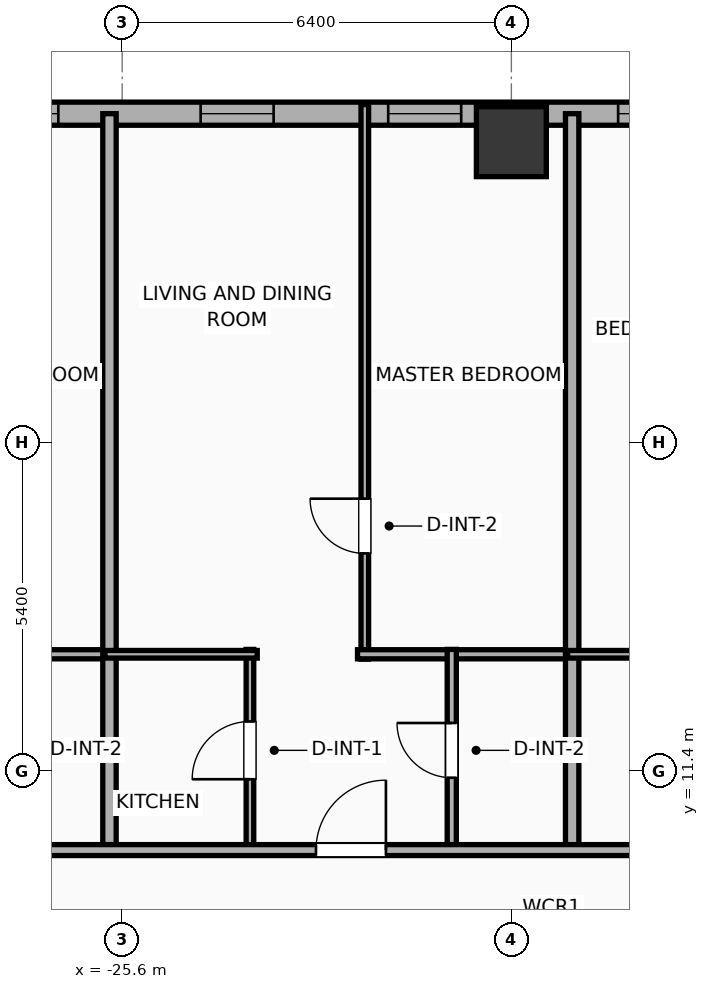
"""IFC4 building model, lengths in metres.
Left out: names, types, materials, properties, quantities, classifications, styles, units other than length and angle.
Written with IfcOpenShell. Run it as: python <this file> out.ifc"""

import sys

from ifc_helpers import new_model, si_unit, direction, frame, frame_2d, origin, origin_2d, place, context, subcontext, project, spatial, rectangle, hollow_rectangle, extrude, element, fill, save


model = new_model("IFC4")
c1 = context("Model", 3, precision=1e-05, world=origin(), true_north=direction((0.0, 1.0)))
c2 = subcontext(c1, "Body", "Model", "MODEL_VIEW")
j1 = project(units=[si_unit("LENGTHUNIT", "METRE"), si_unit("PLANEANGLEUNIT", "RADIAN")], contexts=[c1])
p1 = place(None, origin())
s1 = spatial("IfcSite", under=j1, at=p1, CompositionType="ELEMENT")
p2 = place(p1, origin())
s2 = spatial("IfcBuilding", under=s1, at=p2, CompositionType="ELEMENT")
p3 = place(p2, frame((0.0, 0.0, 37.7)))
s3 = spatial("IfcBuildingStorey", under=s2, at=p3, CompositionType="ELEMENT", Elevation=37.7)
p4 = place(p3, frame((-19.2, 21.75, 0.0), z_axis=(0.0, 0.0, 1.0), x_axis=(1.0, 0.0, 0.0)))
e1 = element("IfcColumn", 1, at=p4, inside=s3, PredefinedType="COLUMN", context=c2, shape_type="SweptSolid", body=[
    extrude(hollow_rectangle(XDim=1.15, YDim=1.15, WallThickness=0.04, at=origin_2d()), origin(), (0.0, 0.0, 1.0), 3.9),
])
p5 = place(p3, frame((-29.581, 22.21, 0.0), z_axis=(0.0, 0.0, 1.0), x_axis=(1.0, 0.0, 0.0)))
e2 = element("IfcWall", 2, at=p5, inside=s3, PredefinedType="ELEMENTEDWALL", context=c2, shape_type="SweptSolid", body=[
    extrude(rectangle(XDim=51.963, YDim=0.38, at=frame_2d((25.981, 0.0))), origin(), (0.0, 0.0, 1.0), 3.65),
])
p6 = place(p5, frame((25.631, 0.0, 0.75)))
e3 = element("IfcOpeningElement", 3, at=p6, cuts=e2, PredefinedType="OPENING", context=c2, shape_type="SweptSolid", body=[
    extrude(rectangle(XDim=2.4, YDim=2.1, at=frame_2d((1.2, 1.05))), frame((0.0, 0.2, 0.0), z_axis=(0.0, -1.0, 0.0), x_axis=(1.0, 0.0, 0.0)), (0.0, 0.0, 1.0), 0.4),
])
p7 = place(p5, frame((42.952, 0.0, 0.75)))
e4 = element("IfcOpeningElement", 4, at=p7, cuts=e2, PredefinedType="OPENING", context=c2, shape_type="SweptSolid", body=[
    extrude(rectangle(XDim=2.4, YDim=2.1, at=frame_2d((1.2, 1.05))), frame((0.0, 0.2, 0.0), z_axis=(0.0, -1.0, 0.0), x_axis=(1.0, 0.0, 0.0)), (0.0, 0.0, 1.0), 0.4),
])
p8 = place(p5, frame((1.731, 0.0, 0.75)))
e5 = element("IfcOpeningElement", 5, at=p8, cuts=e2, PredefinedType="OPENING", context=c2, shape_type="SweptSolid", body=[
    extrude(rectangle(XDim=1.2, YDim=2.05, at=frame_2d((0.6, 1.025))), frame((0.0, 0.2, 0.0), z_axis=(0.0, -1.0, 0.0), x_axis=(1.0, 0.0, 0.0)), (0.0, 0.0, 1.0), 0.4),
])
p9 = place(p5, frame((5.272, 0.0, 0.75)))
e6 = element("IfcOpeningElement", 6, at=p9, cuts=e2, PredefinedType="OPENING", context=c2, shape_type="SweptSolid", body=[
    extrude(rectangle(XDim=1.2, YDim=2.05, at=frame_2d((0.6, 1.025))), frame((0.0, 0.2, 0.0), z_axis=(0.0, -1.0, 0.0), x_axis=(1.0, 0.0, 0.0)), (0.0, 0.0, 1.0), 0.4),
])
p10 = place(p5, frame((8.356, 0.0, 0.75)))
e7 = element("IfcOpeningElement", 7, at=p10, cuts=e2, PredefinedType="OPENING", context=c2, shape_type="SweptSolid", body=[
    extrude(rectangle(XDim=1.2, YDim=2.05, at=frame_2d((0.6, 1.025))), frame((0.0, 0.2, 0.0), z_axis=(0.0, -1.0, 0.0), x_axis=(1.0, 0.0, 0.0)), (0.0, 0.0, 1.0), 0.4),
])
p11 = place(p5, frame((15.632, 0.0, 0.75)))
e8 = element("IfcOpeningElement", 8, at=p11, cuts=e2, PredefinedType="OPENING", context=c2, shape_type="SweptSolid", body=[
    extrude(rectangle(XDim=1.2, YDim=2.05, at=frame_2d((0.6, 1.025))), frame((0.0, 0.2, 0.0), z_axis=(0.0, -1.0, 0.0), x_axis=(1.0, 0.0, 0.0)), (0.0, 0.0, 1.0), 0.4),
])
p12 = place(p5, frame((12.137, 0.0, 0.75)))
e9 = element("IfcOpeningElement", 9, at=p12, cuts=e2, PredefinedType="OPENING", context=c2, shape_type="SweptSolid", body=[
    extrude(rectangle(XDim=1.2, YDim=2.05, at=frame_2d((0.6, 1.025))), frame((0.0, 0.2, 0.0), z_axis=(0.0, -1.0, 0.0), x_axis=(1.0, 0.0, 0.0)), (0.0, 0.0, 1.0), 0.4),
])
p13 = place(p5, frame((18.756, 0.0, 0.75)))
e10 = element("IfcOpeningElement", 10, at=p13, cuts=e2, PredefinedType="OPENING", context=c2, shape_type="SweptSolid", body=[
    extrude(rectangle(XDim=1.2, YDim=2.05, at=frame_2d((0.6, 1.025))), frame((0.0, 0.2, 0.0), z_axis=(0.0, -1.0, 0.0), x_axis=(1.0, 0.0, 0.0)), (0.0, 0.0, 1.0), 0.4),
])
p14 = place(p5, frame((22.907, 0.0, 0.75)))
e11 = element("IfcOpeningElement", 11, at=p14, cuts=e2, PredefinedType="OPENING", context=c2, shape_type="SweptSolid", body=[
    extrude(rectangle(XDim=1.2, YDim=2.05, at=frame_2d((0.6, 1.025))), frame((0.0, 0.2, 0.0), z_axis=(0.0, -1.0, 0.0), x_axis=(1.0, 0.0, 0.0)), (0.0, 0.0, 1.0), 0.4),
])
p15 = place(p5, frame((36.381, 0.0, 0.75)))
e12 = element("IfcOpeningElement", 12, at=p15, cuts=e2, PredefinedType="OPENING", context=c2, shape_type="SweptSolid", body=[
    extrude(rectangle(XDim=1.2, YDim=2.05, at=frame_2d((0.6, 1.025))), frame((0.0, 0.2, 0.0), z_axis=(0.0, -1.0, 0.0), x_axis=(1.0, 0.0, 0.0)), (0.0, 0.0, 1.0), 0.4),
])
p16 = place(p5, frame((32.886, 0.0, 0.75)))
e13 = element("IfcOpeningElement", 13, at=p16, cuts=e2, PredefinedType="OPENING", context=c2, shape_type="SweptSolid", body=[
    extrude(rectangle(XDim=1.2, YDim=2.05, at=frame_2d((0.6, 1.025))), frame((0.0, 0.2, 0.0), z_axis=(0.0, -1.0, 0.0), x_axis=(1.0, 0.0, 0.0)), (0.0, 0.0, 1.0), 0.4),
])
p17 = place(p5, frame((39.556, 0.0, 0.75)))
e14 = element("IfcOpeningElement", 14, at=p17, cuts=e2, PredefinedType="OPENING", context=c2, shape_type="SweptSolid", body=[
    extrude(rectangle(XDim=1.2, YDim=2.05, at=frame_2d((0.6, 1.025))), frame((0.0, 0.2, 0.0), z_axis=(0.0, -1.0, 0.0), x_axis=(1.0, 0.0, 0.0)), (0.0, 0.0, 1.0), 0.4),
])
p18 = place(p5, frame((46.885, 0.0, 0.75)))
e15 = element("IfcOpeningElement", 15, at=p18, cuts=e2, PredefinedType="OPENING", context=c2, shape_type="SweptSolid", body=[
    extrude(rectangle(XDim=1.2, YDim=2.05, at=frame_2d((0.6, 1.025))), frame((0.0, 0.2, 0.0), z_axis=(0.0, -1.0, 0.0), x_axis=(1.0, 0.0, 0.0)), (0.0, 0.0, 1.0), 0.4),
])
p19 = place(p5, frame((49.531, 0.0, 0.75)))
e16 = element("IfcOpeningElement", 16, at=p19, cuts=e2, PredefinedType="OPENING", context=c2, shape_type="SweptSolid", body=[
    extrude(rectangle(XDim=1.2, YDim=2.05, at=frame_2d((0.6, 1.025))), frame((0.0, 0.2, 0.0), z_axis=(0.0, -1.0, 0.0), x_axis=(1.0, 0.0, 0.0)), (0.0, 0.0, 1.0), 0.4),
])
p20 = place(p3, frame((-29.339, 13.32, 0.0), z_axis=(0.0, 0.0, 1.0), x_axis=(1.0, 0.0, 0.0)))
e17 = element("IfcWall", 17, at=p20, inside=s3, PredefinedType="PLUMBINGWALL", context=c2, shape_type="SweptSolid", body=[
    extrude(rectangle(XDim=3.605, YDim=0.15, at=frame_2d((1.803, 0.0))), origin(), (0.0, 0.0, 1.0), 3.65),
])
p21 = place(p3, frame((-25.809, 10.02, 0.0), z_axis=(0.0, 0.0, 1.0), x_axis=(0.0, 1.0, 0.0)))
e18 = element("IfcWall", 18, at=p21, inside=s3, PredefinedType="PARTITIONING", context=c2, shape_type="SweptSolid", body=[
    extrude(rectangle(XDim=12.19, YDim=0.22, at=frame_2d((6.095, 0.0))), origin(), (0.0, 0.0, 1.0), 3.65),
])
p22 = place(p3, frame((-21.61, 13.24, 0.0), z_axis=(0.0, 0.0, 1.0), x_axis=(0.0, 1.0, 0.0)))
e19 = element("IfcWall", 19, at=p22, inside=s3, PredefinedType="PARTITIONING", context=c2, shape_type="SweptSolid", body=[
    extrude(rectangle(XDim=9.12, YDim=0.125, at=frame_2d((4.56, 0.0))), origin(), (0.0, 0.0, 1.0), 3.65),
])
p23 = place(p22, frame((1.739, 0.0, 0.0)))
e20 = element("IfcOpeningElement", 20, at=p23, cuts=e19, PredefinedType="OPENING", context=c2, shape_type="SweptSolid", body=[
    extrude(rectangle(XDim=0.9, YDim=2.05, at=frame_2d((0.45, 1.025))), frame((0.0, 0.073, 0.0), z_axis=(0.0, -1.0, 0.0), x_axis=(1.0, 0.0, 0.0)), (0.0, 0.0, 1.0), 0.145),
])
p24 = place(p3, frame((-21.73, 13.32, 0.0), z_axis=(0.0, 0.0, 1.0), x_axis=(1.0, 0.0, 0.0)))
e21 = element("IfcWall", 21, at=p24, inside=s3, PredefinedType="PLUMBINGWALL", context=c2, shape_type="SweptSolid", body=[
    extrude(rectangle(XDim=3.605, YDim=0.15, at=frame_2d((1.802, 0.0))), origin(), (0.0, 0.0, 1.0), 3.65),
])
p25 = place(p3, frame((-23.499, 10.08, 0.0), z_axis=(0.0, 0.0, 1.0), x_axis=(0.0, 1.0, 0.0)))
e22 = element("IfcWall", 22, at=p25, inside=s3, PredefinedType="PARTITIONING", context=c2, shape_type="SweptSolid", body=[
    extrude(rectangle(XDim=3.32, YDim=0.125, at=frame_2d((1.66, 0.0))), origin(), (0.0, 0.0, 1.0), 3.65),
])
p26 = place(p25, frame((1.185, 0.0, 0.0)))
e23 = element("IfcOpeningElement", 23, at=p26, cuts=e22, PredefinedType="OPENING", context=c2, shape_type="SweptSolid", body=[
    extrude(rectangle(XDim=0.95, YDim=2.05, at=frame_2d((0.475, 1.025))), frame((0.0, 0.073, 0.0), z_axis=(0.0, -1.0, 0.0), x_axis=(1.0, 0.0, 0.0)), (0.0, 0.0, 1.0), 0.145),
])
p27 = place(p3, frame((-25.884, 13.32, 0.0), z_axis=(0.0, 0.0, 1.0), x_axis=(1.0, 0.0, 0.0)))
e24 = element("IfcWall", 24, at=p27, inside=s3, PredefinedType="PARTITIONING", context=c2, shape_type="SweptSolid", body=[
    extrude(rectangle(XDim=2.505, YDim=0.125, at=frame_2d((1.252, 0.0))), origin(), (0.0, 0.0, 1.0), 3.65),
])
p28 = place(p3, frame((-20.18, 10.08, 0.0), z_axis=(0.0, 0.0, 1.0), x_axis=(0.0, 1.0, 0.0)))
e25 = element("IfcWall", 25, at=p28, inside=s3, PredefinedType="PLUMBINGWALL", context=c2, shape_type="SweptSolid", body=[
    extrude(rectangle(XDim=3.32, YDim=0.15, at=frame_2d((1.66, 0.0))), origin(), (0.0, 0.0, 1.0), 3.65),
])
p29 = place(p28, frame((1.21, 0.0, 0.0)))
e26 = element("IfcOpeningElement", 26, at=p29, cuts=e25, PredefinedType="OPENING", context=c2, shape_type="SweptSolid", body=[
    extrude(rectangle(XDim=0.9, YDim=2.05, at=frame_2d((0.45, 1.025))), frame((0.0, 0.085, 0.0), z_axis=(0.0, -1.0, 0.0), x_axis=(1.0, 0.0, 0.0)), (0.0, 0.0, 1.0), 0.17),
])
p30 = place(p3, frame((-18.2, 10.02, 0.0), z_axis=(0.0, 0.0, 1.0), x_axis=(0.0, 1.0, 0.0)))
e27 = element("IfcWall", 27, at=p30, inside=s3, PredefinedType="PARTITIONING", context=c2, shape_type="SweptSolid", body=[
    extrude(rectangle(XDim=12.19, YDim=0.22, at=frame_2d((6.095, 0.0))), origin(), (0.0, 0.0, 1.0), 3.65),
])
p31 = place(p3, frame((-18.275, 13.32, 0.0), z_axis=(0.0, 0.0, 1.0), x_axis=(1.0, 0.0, 0.0)))
e28 = element("IfcWall", 28, at=p31, inside=s3, PredefinedType="PARTITIONING", context=c2, shape_type="SweptSolid", body=[
    extrude(rectangle(XDim=2.969, YDim=0.125, at=frame_2d((1.484, 0.0))), origin(), (0.0, 0.0, 1.0), 3.65),
])
p32 = place(p3, frame((-33.41, 10.1, 0.0), z_axis=(0.0, 0.0, 1.0), x_axis=(1.0, 0.0, 0.0)))
e29 = element("IfcWall", 29, at=p32, inside=s3, PredefinedType="PARTITIONING", context=c2, shape_type="SweptSolid", body=[
    extrude(rectangle(XDim=59.62, YDim=0.18, at=frame_2d((29.81, 0.0))), origin(), (0.0, 0.0, 1.0), 3.65),
])
p33 = place(p32, frame((3.354, 0.0, 0.0)))
e30 = element("IfcOpeningElement", 30, at=p33, cuts=e29, PredefinedType="OPENING", context=c2, shape_type="SweptSolid", body=[
    extrude(rectangle(XDim=1.15, YDim=2.05, at=frame_2d((0.575, 1.025))), frame((0.0, 0.1, 0.0), z_axis=(0.0, -1.0, 0.0), x_axis=(1.0, 0.0, 0.0)), (0.0, 0.0, 1.0), 0.2),
])
p34 = place(p32, frame((10.997, 0.0, 0.0)))
e31 = element("IfcOpeningElement", 31, at=p34, cuts=e29, PredefinedType="OPENING", context=c2, shape_type="SweptSolid", body=[
    extrude(rectangle(XDim=1.15, YDim=2.05, at=frame_2d((0.575, 1.025))), frame((0.0, 0.1, 0.0), z_axis=(0.0, -1.0, 0.0), x_axis=(1.0, 0.0, 0.0)), (0.0, 0.0, 1.0), 0.2),
])
p35 = place(p32, frame((20.232, 0.0, 0.0)))
e32 = element("IfcOpeningElement", 32, at=p35, cuts=e29, PredefinedType="OPENING", context=c2, shape_type="SweptSolid", body=[
    extrude(rectangle(XDim=1.15, YDim=2.05, at=frame_2d((0.575, 1.025))), frame((0.0, 0.1, 0.0), z_axis=(0.0, -1.0, 0.0), x_axis=(1.0, 0.0, 0.0)), (0.0, 0.0, 1.0), 0.2),
])
p36 = place(p32, frame((30.38, 0.0, 0.0)))
e33 = element("IfcOpeningElement", 33, at=p36, cuts=e29, PredefinedType="OPENING", context=c2, shape_type="SweptSolid", body=[
    extrude(rectangle(XDim=1.15, YDim=2.05, at=frame_2d((0.575, 1.025))), frame((0.0, 0.1, 0.0), z_axis=(0.0, -1.0, 0.0), x_axis=(1.0, 0.0, 0.0)), (0.0, 0.0, 1.0), 0.2),
])
p37 = place(p32, frame((40.998, 0.0, 0.0)))
e34 = element("IfcOpeningElement", 34, at=p37, cuts=e29, PredefinedType="OPENING", context=c2, shape_type="SweptSolid", body=[
    extrude(rectangle(XDim=1.15, YDim=2.05, at=frame_2d((0.575, 1.025))), frame((0.0, 0.1, 0.0), z_axis=(0.0, -1.0, 0.0), x_axis=(1.0, 0.0, 0.0)), (0.0, 0.0, 1.0), 0.2),
])
p38 = place(p32, frame((49.428, 0.0, 0.0)))
e35 = element("IfcOpeningElement", 35, at=p38, cuts=e29, PredefinedType="OPENING", context=c2, shape_type="SweptSolid", body=[
    extrude(rectangle(XDim=0.9, YDim=2.05, at=frame_2d((0.45, 1.025))), frame((0.0, 0.1, 0.0), z_axis=(0.0, -1.0, 0.0), x_axis=(1.0, 0.0, 0.0)), (0.0, 0.0, 1.0), 0.2),
])
p39 = place(p32, frame((56.07, 0.0, 0.0)))
e36 = element("IfcOpeningElement", 36, at=p39, cuts=e29, PredefinedType="OPENING", context=c2, shape_type="SweptSolid", body=[
    extrude(rectangle(XDim=0.9, YDim=2.05, at=frame_2d((0.45, 1.025))), frame((0.0, 0.1, 0.0), z_axis=(0.0, -1.0, 0.0), x_axis=(1.0, 0.0, 0.0)), (0.0, 0.0, 1.0), 0.2),
])
p40 = place(p8, origin())
e37 = element("IfcWindow", 37, at=p40, inside=s3, PartitioningType="SINGLE_PANEL", PredefinedType="WINDOW", context=c2, shape_type="SweptSolid", body=[
    extrude(rectangle(XDim=1.2, YDim=2.05, at=frame_2d((0.6, 1.025))), frame((0.0, 0.03, 0.0), z_axis=(0.0, -1.0, 0.0), x_axis=(1.0, 0.0, 0.0)), (0.0, 0.0, 1.0), 0.06),
])
fill(e5, e37)
p41 = place(p9, origin())
e38 = element("IfcWindow", 38, at=p41, inside=s3, PartitioningType="SINGLE_PANEL", PredefinedType="WINDOW", context=c2, shape_type="SweptSolid", body=[
    extrude(rectangle(XDim=1.2, YDim=2.05, at=frame_2d((0.6, 1.025))), frame((0.0, 0.03, 0.0), z_axis=(0.0, -1.0, 0.0), x_axis=(1.0, 0.0, 0.0)), (0.0, 0.0, 1.0), 0.06),
])
fill(e6, e38)
p42 = place(p10, origin())
e39 = element("IfcWindow", 39, at=p42, inside=s3, PartitioningType="SINGLE_PANEL", PredefinedType="WINDOW", context=c2, shape_type="SweptSolid", body=[
    extrude(rectangle(XDim=1.2, YDim=2.05, at=frame_2d((0.6, 1.025))), frame((0.0, 0.03, 0.0), z_axis=(0.0, -1.0, 0.0), x_axis=(1.0, 0.0, 0.0)), (0.0, 0.0, 1.0), 0.06),
])
fill(e7, e39)
p43 = place(p12, origin())
e40 = element("IfcWindow", 40, at=p43, inside=s3, PartitioningType="SINGLE_PANEL", PredefinedType="WINDOW", context=c2, shape_type="SweptSolid", body=[
    extrude(rectangle(XDim=1.2, YDim=2.05, at=frame_2d((0.6, 1.025))), frame((0.0, 0.03, 0.0), z_axis=(0.0, -1.0, 0.0), x_axis=(1.0, 0.0, 0.0)), (0.0, 0.0, 1.0), 0.06),
])
fill(e9, e40)
p44 = place(p23, origin())
e41 = element("IfcDoor", 41, at=p44, inside=s3, OperationType="SINGLE_SWING_RIGHT", PredefinedType="DOOR", context=c2, shape_type="SweptSolid", body=[
    extrude(rectangle(XDim=0.9, YDim=2.05, at=frame_2d((0.45, 1.025))), frame((0.0, 0.025, 0.0), z_axis=(0.0, -1.0, 0.0), x_axis=(1.0, 0.0, 0.0)), (0.0, 0.0, 1.0), 0.05),
])
fill(e20, e41)
p45 = place(p26, origin())
e42 = element("IfcDoor", 42, at=p45, inside=s3, OperationType="SINGLE_SWING_LEFT", PredefinedType="DOOR", context=c2, shape_type="SweptSolid", body=[
    extrude(rectangle(XDim=0.95, YDim=2.05, at=frame_2d((0.475, 1.025))), frame((0.0, 0.025, 0.0), z_axis=(0.0, -1.0, 0.0), x_axis=(1.0, 0.0, 0.0)), (0.0, 0.0, 1.0), 0.05),
])
fill(e23, e42)
p46 = place(p29, origin())
e43 = element("IfcDoor", 43, at=p46, inside=s3, OperationType="SINGLE_SWING_RIGHT", PredefinedType="DOOR", context=c2, shape_type="SweptSolid", body=[
    extrude(rectangle(XDim=0.9, YDim=2.05, at=frame_2d((0.45, 1.025))), frame((0.0, 0.025, 0.0), z_axis=(0.0, -1.0, 0.0), x_axis=(1.0, 0.0, 0.0)), (0.0, 0.0, 1.0), 0.05),
])
fill(e26, e43)
p47 = place(p34, origin())
e44 = element("IfcDoor", 44, at=p47, inside=s3, OperationType="SINGLE_SWING_RIGHT", PredefinedType="DOOR", context=c2, shape_type="SweptSolid", body=[
    extrude(rectangle(XDim=1.15, YDim=2.05, at=frame_2d((0.575, 1.025))), frame((0.0, 0.025, 0.0), z_axis=(0.0, -1.0, 0.0), x_axis=(1.0, 0.0, 0.0)), (0.0, 0.0, 1.0), 0.05),
])
fill(e31, e44)
save(model, sys.argv[1])
